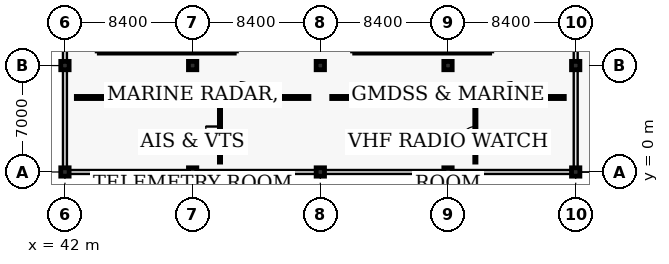
"""IFC4 building model, lengths in metres.
Left out: names, types, materials, properties, quantities, classifications, styles, units other than length and angle.
Written with IfcOpenShell. Run it as: python <this file> out.ifc"""

import sys

from ifc_helpers import new_model, si_unit, direction, frame, frame_2d, origin, origin_2d, place, context, subcontext, project, spatial, rectangle, extrude, element, fill, save


model = new_model("IFC4")
c1 = context("Model", 3, precision=1e-05, world=origin(), true_north=direction((0.0, 1.0)))
c2 = subcontext(c1, "Body", "Model", "MODEL_VIEW")
j1 = project(units=[si_unit("LENGTHUNIT", "METRE"), si_unit("PLANEANGLEUNIT", "RADIAN")], contexts=[c1])
p1 = place(None, origin())
s1 = spatial("IfcSite", under=j1, at=p1, CompositionType="ELEMENT")
p2 = place(p1, origin())
s2 = spatial("IfcBuilding", under=s1, at=p2, CompositionType="ELEMENT")
p3 = place(p2, frame((0.0, 0.0, 16.32)))
s3 = spatial("IfcBuildingStorey", under=s2, at=p3, CompositionType="ELEMENT", Elevation=16.32)
for number, where, z_axis, x_axis in (
    (1, (42.0, 0.0, 0.0), (0.0, 0.0, 1.0), (1.0, 0.0, 0.0)),
    (2, (42.0, 7.0, 0.0), (0.0, 0.0, 1.0), (1.0, 0.0, 0.0)),
    (3, (50.4, 0.0, 0.0), (0.0, 0.0, 1.0), (1.0, 0.0, 0.0)),
    (4, (50.4, 7.0, 0.0), (0.0, 0.0, 1.0), (1.0, 0.0, 0.0)),
    (5, (58.8, 0.0, 0.0), (0.0, 0.0, 1.0), (1.0, 0.0, 0.0)),
    (6, (58.8, 7.0, 0.0), (0.0, 0.0, 1.0), (1.0, 0.0, 0.0)),
    (7, (67.2, 0.0, 0.0), (0.0, 0.0, 1.0), (1.0, 0.0, 0.0)),
    (8, (67.2, 7.0, 0.0), (0.0, 0.0, 1.0), (1.0, 0.0, 0.0)),
    (9, (75.6, 0.0, 0.0), (0.0, 0.0, 1.0), (1.0, 0.0, 0.0)),
    (10, (75.6, 7.0, 0.0), (0.0, 0.0, 1.0), (1.0, 0.0, 0.0)),
):
    element("IfcColumn", number, at=place(p3, frame(where, z_axis=z_axis, x_axis=x_axis)), inside=s3, PredefinedType="COLUMN", context=c2, shape_type="SweptSolid", body=[
        extrude(rectangle(XDim=0.55, YDim=0.55, at=origin_2d()), origin(), (0.0, 0.0, 1.0), 3.2),
    ])
for number, where, z_axis, x_axis in (
    (11, (44.26, 7.96, 0.0), (0.0, 0.0, 1.0), (1.0, 0.0, 0.0)),
    (12, (61.06, 7.96, 0.0), (0.0, 0.0, 1.0), (1.0, 0.0, 0.0)),
):
    element("IfcWall", number, at=place(p3, frame(where, z_axis=z_axis, x_axis=x_axis)), inside=s3, PredefinedType="SHEAR", context=c2, shape_type="SweptSolid", body=[
        extrude(rectangle(XDim=8.88, YDim=0.28, at=frame_2d((4.44, 0.0))), origin(), (0.0, 0.0, 1.0), 3.2),
    ])
p4 = place(p3, frame((42.75, 4.9, 0.0), z_axis=(0.0, 0.0, 1.0), x_axis=(1.0, 0.0, 0.0)))
e13 = element("IfcWall", 13, at=p4, inside=s3, PredefinedType="PARTITIONING", context=c2, shape_type="SweptSolid", body=[
    extrude(rectangle(XDim=6.9, YDim=0.14, at=frame_2d((3.45, 0.0))), origin(), (0.0, 0.0, 1.0), 2.55),
])
p5 = place(p4, frame((2.4, 0.0, 0.0)))
e14 = element("IfcOpeningElement", 14, at=p5, cuts=e13, PredefinedType="OPENING", context=c2, shape_type="SweptSolid", body=[
    extrude(rectangle(XDim=0.98, YDim=2.12, at=frame_2d((0.49, 1.06))), frame((0.0, 0.08, 0.0), z_axis=(0.0, -1.0, 0.0), x_axis=(1.0, 0.0, 0.0)), (0.0, 0.0, 1.0), 0.16),
])
p6 = place(p3, frame((51.15, 4.9, 0.0), z_axis=(0.0, 0.0, 1.0), x_axis=(1.0, 0.0, 0.0)))
e15 = element("IfcWall", 15, at=p6, inside=s3, PredefinedType="PARTITIONING", context=c2, shape_type="SweptSolid", body=[
    extrude(rectangle(XDim=6.9, YDim=0.14, at=frame_2d((3.45, 0.0))), origin(), (0.0, 0.0, 1.0), 2.55),
])
p7 = place(p6, frame((2.4, 0.0, 0.0)))
e16 = element("IfcOpeningElement", 16, at=p7, cuts=e15, PredefinedType="OPENING", context=c2, shape_type="SweptSolid", body=[
    extrude(rectangle(XDim=1.04, YDim=2.14, at=frame_2d((0.52, 1.07))), frame((0.0, 0.08, 0.0), z_axis=(0.0, -1.0, 0.0), x_axis=(1.0, 0.0, 0.0)), (0.0, 0.0, 1.0), 0.16),
])
p8 = place(p3, frame((52.2, 0.65, 0.0), z_axis=(0.0, 0.0, 1.0), x_axis=(0.0, 1.0, 0.0)))
e17 = element("IfcWall", 17, at=p8, inside=s3, PredefinedType="PARTITIONING", context=c2, shape_type="SweptSolid", body=[
    extrude(rectangle(XDim=4.1, YDim=0.08, at=frame_2d((2.05, 0.0))), origin(), (0.0, 0.0, 1.0), 2.5),
])
p9 = place(p8, frame((1.4, 0.0, 0.0)))
e18 = element("IfcOpeningElement", 18, at=p9, cuts=e17, PredefinedType="OPENING", context=c2, shape_type="SweptSolid", body=[
    extrude(rectangle(XDim=0.94, YDim=2.08, at=frame_2d((0.47, 1.04))), frame((0.0, 0.05, 0.0), z_axis=(0.0, -1.0, 0.0), x_axis=(1.0, 0.0, 0.0)), (0.0, 0.0, 1.0), 0.1),
])
p10 = place(p3, frame((59.55, 4.9, 0.0), z_axis=(0.0, 0.0, 1.0), x_axis=(1.0, 0.0, 0.0)))
e19 = element("IfcWall", 19, at=p10, inside=s3, PredefinedType="PARTITIONING", context=c2, shape_type="SweptSolid", body=[
    extrude(rectangle(XDim=6.9, YDim=0.14, at=frame_2d((3.45, 0.0))), origin(), (0.0, 0.0, 1.0), 2.55),
])
p11 = place(p10, frame((2.4, 0.0, 0.0)))
e20 = element("IfcOpeningElement", 20, at=p11, cuts=e19, PredefinedType="OPENING", context=c2, shape_type="SweptSolid", body=[
    extrude(rectangle(XDim=0.98, YDim=2.12, at=frame_2d((0.49, 1.06))), frame((0.0, 0.08, 0.0), z_axis=(0.0, -1.0, 0.0), x_axis=(1.0, 0.0, 0.0)), (0.0, 0.0, 1.0), 0.16),
])
p12 = place(p3, frame((67.95, 4.9, 0.0), z_axis=(0.0, 0.0, 1.0), x_axis=(1.0, 0.0, 0.0)))
e21 = element("IfcWall", 21, at=p12, inside=s3, PredefinedType="PARTITIONING", context=c2, shape_type="SweptSolid", body=[
    extrude(rectangle(XDim=6.9, YDim=0.14, at=frame_2d((3.45, 0.0))), origin(), (0.0, 0.0, 1.0), 2.55),
])
p13 = place(p12, frame((2.4, 0.0, 0.0)))
e22 = element("IfcOpeningElement", 22, at=p13, cuts=e21, PredefinedType="OPENING", context=c2, shape_type="SweptSolid", body=[
    extrude(rectangle(XDim=1.04, YDim=2.14, at=frame_2d((0.52, 1.07))), frame((0.0, 0.08, 0.0), z_axis=(0.0, -1.0, 0.0), x_axis=(1.0, 0.0, 0.0)), (0.0, 0.0, 1.0), 0.16),
])
p14 = place(p3, frame((69.0, 0.65, 0.0), z_axis=(0.0, 0.0, 1.0), x_axis=(0.0, 1.0, 0.0)))
e23 = element("IfcWall", 23, at=p14, inside=s3, PredefinedType="PARTITIONING", context=c2, shape_type="SweptSolid", body=[
    extrude(rectangle(XDim=4.1, YDim=0.08, at=frame_2d((2.05, 0.0))), origin(), (0.0, 0.0, 1.0), 2.5),
])
p15 = place(p14, frame((1.4, 0.0, 0.0)))
e24 = element("IfcOpeningElement", 24, at=p15, cuts=e23, PredefinedType="OPENING", context=c2, shape_type="SweptSolid", body=[
    extrude(rectangle(XDim=0.94, YDim=2.08, at=frame_2d((0.47, 1.04))), frame((0.0, 0.05, 0.0), z_axis=(0.0, -1.0, 0.0), x_axis=(1.0, 0.0, 0.0)), (0.0, 0.0, 1.0), 0.1),
])
p16 = place(p5, origin())
e25 = element("IfcDoor", 25, at=p16, inside=s3, OperationType="SINGLE_SWING_LEFT", PredefinedType="DOOR", context=c2, shape_type="SweptSolid", body=[
    extrude(rectangle(XDim=0.98, YDim=2.12, at=frame_2d((0.49, 1.06))), frame((0.0, 0.025, 0.0), z_axis=(0.0, -1.0, 0.0), x_axis=(1.0, 0.0, 0.0)), (0.0, 0.0, 1.0), 0.05),
])
fill(e14, e25)
p17 = place(p7, origin())
e26 = element("IfcDoor", 26, at=p17, inside=s3, OperationType="SINGLE_SWING_LEFT", PredefinedType="DOOR", context=c2, shape_type="SweptSolid", body=[
    extrude(rectangle(XDim=1.04, YDim=2.14, at=frame_2d((0.52, 1.07))), frame((0.0, 0.025, 0.0), z_axis=(0.0, -1.0, 0.0), x_axis=(1.0, 0.0, 0.0)), (0.0, 0.0, 1.0), 0.05),
])
fill(e16, e26)
p18 = place(p9, origin())
e27 = element("IfcDoor", 27, at=p18, inside=s3, OperationType="SINGLE_SWING_RIGHT", PredefinedType="DOOR", context=c2, shape_type="SweptSolid", body=[
    extrude(rectangle(XDim=0.94, YDim=2.08, at=frame_2d((0.47, 1.04))), frame((0.0, 0.025, 0.0), z_axis=(0.0, -1.0, 0.0), x_axis=(1.0, 0.0, 0.0)), (0.0, 0.0, 1.0), 0.05),
])
fill(e18, e27)
p19 = place(p11, origin())
e28 = element("IfcDoor", 28, at=p19, inside=s3, OperationType="SINGLE_SWING_RIGHT", PredefinedType="DOOR", context=c2, shape_type="SweptSolid", body=[
    extrude(rectangle(XDim=0.98, YDim=2.12, at=frame_2d((0.49, 1.06))), frame((0.0, 0.025, 0.0), z_axis=(0.0, -1.0, 0.0), x_axis=(1.0, 0.0, 0.0)), (0.0, 0.0, 1.0), 0.05),
])
fill(e20, e28)
p20 = place(p13, origin())
e29 = element("IfcDoor", 29, at=p20, inside=s3, OperationType="SINGLE_SWING_RIGHT", PredefinedType="DOOR", context=c2, shape_type="SweptSolid", body=[
    extrude(rectangle(XDim=1.04, YDim=2.14, at=frame_2d((0.52, 1.07))), frame((0.0, 0.025, 0.0), z_axis=(0.0, -1.0, 0.0), x_axis=(1.0, 0.0, 0.0)), (0.0, 0.0, 1.0), 0.05),
])
fill(e22, e29)
p21 = place(p15, origin())
e30 = element("IfcDoor", 30, at=p21, inside=s3, OperationType="SINGLE_SWING_LEFT", PredefinedType="DOOR", context=c2, shape_type="SweptSolid", body=[
    extrude(rectangle(XDim=0.94, YDim=2.08, at=frame_2d((0.47, 1.04))), frame((0.0, 0.025, 0.0), z_axis=(0.0, -1.0, 0.0), x_axis=(1.0, 0.0, 0.0)), (0.0, 0.0, 1.0), 0.05),
])
fill(e24, e30)
save(model, sys.argv[1])
